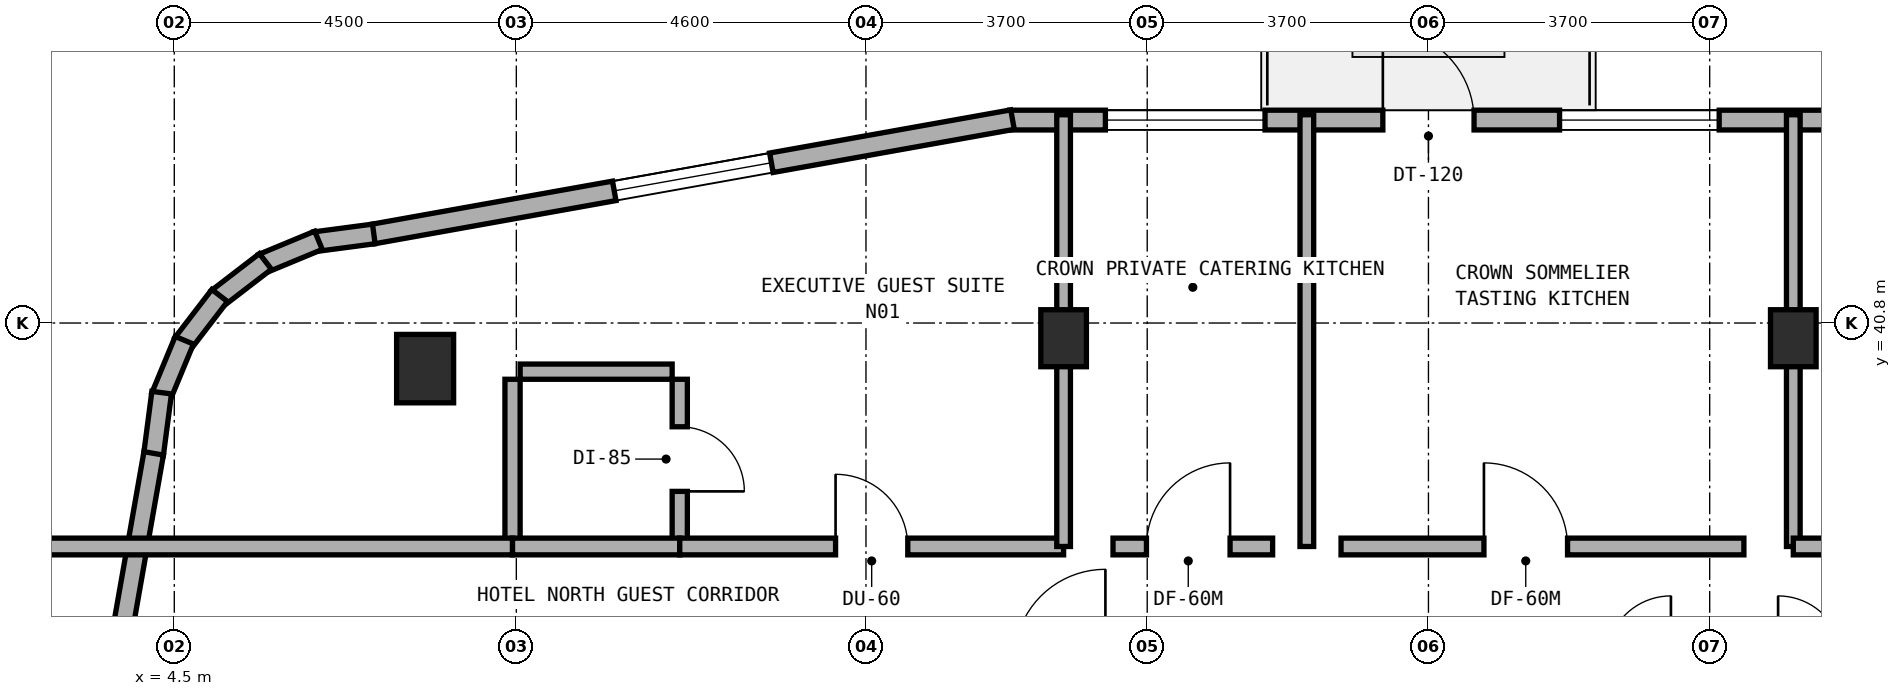
"""IFC4 building model, lengths in metres.
Left out: names, types, materials, properties, quantities, classifications, styles, units other than length and angle.
Written with IfcOpenShell. Run it as: python <this file> out.ifc"""

import sys

from ifc_helpers import new_model, si_unit, direction, frame, frame_2d, origin, origin_2d, place, context, subcontext, project, spatial, rectangle, extrude, element, fill, save


model = new_model("IFC4")
c1 = context("Model", 3, precision=1e-05, world=origin(), true_north=direction((0.0, 1.0)))
c2 = subcontext(c1, "Body", "Model", "MODEL_VIEW")
j1 = project(units=[si_unit("LENGTHUNIT", "METRE"), si_unit("PLANEANGLEUNIT", "RADIAN")], contexts=[c1])
p1 = place(None, origin())
s1 = spatial("IfcSite", under=j1, at=p1, CompositionType="ELEMENT")
p2 = place(p1, origin())
s2 = spatial("IfcBuilding", under=s1, at=p2, CompositionType="ELEMENT")
p3 = place(p2, frame((0.0, 0.0, 243.2)))
s3 = spatial("IfcBuildingStorey", under=s2, at=p3, CompositionType="ELEMENT", Elevation=243.2)
for number, where, z_axis, x_axis in (
    (1, (16.2, 40.6, 0.0), (0.0, 0.0, 1.0), (1.0, 0.0, 0.0)),
    (2, (25.8, 40.6, 0.0), (0.0, 0.0, 1.0), (1.0, 0.0, 0.0)),
):
    element("IfcColumn", number, at=place(p3, frame(where, z_axis=z_axis, x_axis=x_axis)), inside=s3, PredefinedType="COLUMN", context=c2, shape_type="SweptSolid", body=[
        extrude(rectangle(XDim=0.6, YDim=0.75, at=origin_2d()), origin(), (0.0, 0.0, 1.0), 3.6),
    ])
p4 = place(p3, frame((7.8, 40.2, 0.0), z_axis=(0.0, 0.0, 1.0), x_axis=(1.0, 0.0, 0.0)))
e3 = element("IfcColumn", 3, at=p4, inside=s3, PredefinedType="COLUMN", context=c2, shape_type="SweptSolid", body=[
    extrude(rectangle(XDim=0.75, YDim=0.9, at=origin_2d()), origin(), (0.0, 0.0, 1.0), 3.6),
])
p5 = place(p3, frame((26.545, 43.47, 0.0), z_axis=(0.0, 0.0, 1.0), x_axis=(-1.0, 0.0, 0.0)))
e4 = element("IfcWall", 4, at=p5, inside=s3, PredefinedType="STANDARD", context=c2, shape_type="SweptSolid", body=[
    extrude(rectangle(XDim=11.055, YDim=0.26, at=frame_2d((5.527, 0.0))), origin(), (0.0, 0.0, 1.0), 3.32),
])
p6 = place(p5, frame((4.945, 0.0, 0.0)))
e5 = element("IfcOpeningElement", 5, at=p6, cuts=e4, PredefinedType="OPENING", context=c2, shape_type="SweptSolid", body=[
    extrude(rectangle(XDim=1.2, YDim=2.15, at=frame_2d((0.6, 1.075))), frame((0.0, 0.14, 0.0), z_axis=(0.0, -1.0, 0.0), x_axis=(1.0, 0.0, 0.0)), (0.0, 0.0, 1.0), 0.28),
])
p7 = place(p5, frame((1.72, 0.0, 0.85)))
e6 = element("IfcOpeningElement", 6, at=p7, cuts=e4, PredefinedType="OPENING", context=c2, shape_type="SweptSolid", body=[
    extrude(rectangle(XDim=2.1, YDim=1.5, at=frame_2d((1.05, 0.75))), frame((0.0, 0.14, 0.0), z_axis=(0.0, -1.0, 0.0), x_axis=(1.0, 0.0, 0.0)), (0.0, 0.0, 1.0), 0.28),
])
p8 = place(p5, frame((7.695, 0.0, 0.85)))
e7 = element("IfcOpeningElement", 7, at=p8, cuts=e4, PredefinedType="OPENING", context=c2, shape_type="SweptSolid", body=[
    extrude(rectangle(XDim=2.1, YDim=1.5, at=frame_2d((1.05, 0.75))), frame((0.0, 0.14, 0.0), z_axis=(0.0, -1.0, 0.0), x_axis=(1.0, 0.0, 0.0)), (0.0, 0.0, 1.0), 0.28),
])
p9 = place(p3, frame((15.528, 43.476, 0.0), z_axis=(0.0, 0.0, 1.0), x_axis=(-0.98437102902, -0.176107005047, 0.0)))
e8 = element("IfcWall", 8, at=p9, inside=s3, PredefinedType="STANDARD", context=c2, shape_type="SweptSolid", body=[
    extrude(rectangle(XDim=8.547, YDim=0.26, at=frame_2d((4.273, 0.0))), origin(), (0.0, 0.0, 1.0), 3.32),
])
p10 = place(p9, frame((3.223, 0.0, 0.85)))
e9 = element("IfcOpeningElement", 9, at=p10, cuts=e8, PredefinedType="OPENING", context=c2, shape_type="SweptSolid", body=[
    extrude(rectangle(XDim=2.1, YDim=1.5, at=frame_2d((1.05, 0.75))), frame((0.0, 0.14, 0.0), z_axis=(0.0, -1.0, 0.0), x_axis=(1.0, 0.0, 0.0)), (0.0, 0.0, 1.0), 0.28),
])
p11 = place(p3, frame((7.125, 41.972, 0.0), z_axis=(0.0, 0.0, 1.0), x_axis=(-0.991458553189, -0.130422150372, 0.0)))
e10 = element("IfcWall", 10, at=p11, inside=s3, PredefinedType="STANDARD", context=c2, shape_type="SweptSolid", body=[
    extrude(rectangle(XDim=0.781, YDim=0.26, at=frame_2d((0.39, 0.0))), origin(), (0.0, 0.0, 1.0), 3.32),
])
p12 = place(p3, frame((6.397, 41.888, 0.0), z_axis=(0.0, 0.0, 1.0), x_axis=(-0.923789573295, -0.382900540965, 0.0)))
e11 = element("IfcWall", 11, at=p12, inside=s3, PredefinedType="STANDARD", context=c2, shape_type="SweptSolid", body=[
    extrude(rectangle(XDim=0.799, YDim=0.26, at=frame_2d((0.399, 0.0))), origin(), (0.0, 0.0, 1.0), 3.32),
])
for number, where, z_axis, x_axis in (
    (12, (5.699, 41.61, 0.0), (0.0, 0.0, 1.0), (-0.793, -0.609, 0.0)),
    (13, (5.097, 41.162, 0.0), (0.0, 0.0, 1.0), (-0.609, -0.793, 0.0)),
):
    element("IfcWall", number, at=place(p3, frame(where, z_axis=z_axis, x_axis=x_axis)), inside=s3, PredefinedType="STANDARD", context=c2, shape_type="SweptSolid", body=[
        extrude(rectangle(XDim=0.798, YDim=0.26, at=frame_2d((0.399, 0.0))), origin(), (0.0, 0.0, 1.0), 3.32),
    ])
p13 = place(p3, frame((4.632, 40.573, 0.0), z_axis=(0.0, 0.0, 1.0), x_axis=(-0.383161279238, -0.923681457047, 0.0)))
e14 = element("IfcWall", 14, at=p13, inside=s3, PredefinedType="STANDARD", context=c2, shape_type="SweptSolid", body=[
    extrude(rectangle(XDim=0.799, YDim=0.26, at=frame_2d((0.399, 0.0))), origin(), (0.0, 0.0, 1.0), 3.32),
])
p14 = place(p3, frame((4.334, 39.884, 0.0), z_axis=(0.0, 0.0, 1.0), x_axis=(-0.129850802102, -0.99153354416, 0.0)))
e15 = element("IfcWall", 15, at=p14, inside=s3, PredefinedType="STANDARD", context=c2, shape_type="SweptSolid", body=[
    extrude(rectangle(XDim=0.816, YDim=0.26, at=frame_2d((0.408, 0.0))), origin(), (0.0, 0.0, 1.0), 3.32),
])
p15 = place(p3, frame((4.229, 39.085, 0.0), z_axis=(0.0, 0.0, 1.0), x_axis=(-0.173396937698, -0.984852020355, 0.0)))
e16 = element("IfcWall", 16, at=p15, inside=s3, PredefinedType="STANDARD", context=c2, shape_type="SweptSolid", body=[
    extrude(rectangle(XDim=8.714, YDim=0.26, at=frame_2d((4.357, 0.0))), origin(), (0.0, 0.0, 1.0), 3.32),
])
p16 = place(p15, frame((3.987, 0.0, 0.85)))
e17 = element("IfcOpeningElement", 17, at=p16, cuts=e16, PredefinedType="OPENING", context=c2, shape_type="SweptSolid", body=[
    extrude(rectangle(XDim=2.1, YDim=1.5, at=frame_2d((1.05, 0.75))), frame((0.0, 0.14, 0.0), z_axis=(0.0, -1.0, 0.0), x_axis=(1.0, 0.0, 0.0)), (0.0, 0.0, 1.0), 0.28),
])
p17 = place(p3, frame((11.15, 37.96, 0.0), z_axis=(0.0, 0.0, 1.0), x_axis=(0.0, 1.0, 0.0)))
e18 = element("IfcWall", 18, at=p17, inside=s3, PredefinedType="PLUMBINGWALL", context=c2, shape_type="SweptSolid", body=[
    extrude(rectangle(XDim=2.1, YDim=0.2, at=frame_2d((1.05, 0.0))), origin(), (0.0, 0.0, 1.0), 2.995),
])
p18 = place(p17, frame((0.625, 0.0, 0.0)))
e19 = element("IfcOpeningElement", 19, at=p18, cuts=e18, PredefinedType="OPENING", context=c2, shape_type="SweptSolid", body=[
    extrude(rectangle(XDim=0.85, YDim=2.1, at=frame_2d((0.425, 1.05))), frame((0.0, 0.11, 0.0), z_axis=(0.0, -1.0, 0.0), x_axis=(1.0, 0.0, 0.0)), (0.0, 0.0, 1.0), 0.22),
])
p19 = place(p3, frame((9.05, 40.16, 0.0), z_axis=(0.0, 0.0, 1.0), x_axis=(1.0, 0.0, 0.0)))
e20 = element("IfcWall", 20, at=p19, inside=s3, PredefinedType="PLUMBINGWALL", context=c2, shape_type="SweptSolid", body=[
    extrude(rectangle(XDim=2.0, YDim=0.2, at=frame_2d((1.0, 0.0))), origin(), (0.0, 0.0, 1.0), 3.015),
])
p20 = place(p3, frame((8.95, 37.96, 0.0), z_axis=(0.0, 0.0, 1.0), x_axis=(0.0, 1.0, 0.0)))
e21 = element("IfcWall", 21, at=p20, inside=s3, PredefinedType="PLUMBINGWALL", context=c2, shape_type="SweptSolid", body=[
    extrude(rectangle(XDim=2.1, YDim=0.2, at=frame_2d((1.05, 0.0))), origin(), (0.0, 0.0, 1.0), 2.995),
])
p21 = place(p3, frame((2.76, 37.86, 0.0), z_axis=(0.0, 0.0, 1.0), x_axis=(1.0, 0.0, 0.0)))
e22 = element("IfcWall", 22, at=p21, inside=s3, PredefinedType="SOLIDWALL", context=c2, shape_type="SweptSolid", body=[
    extrude(rectangle(XDim=6.19, YDim=0.22, at=frame_2d((3.095, 0.0))), origin(), (0.0, 0.0, 1.0), 2.745),
])
p22 = place(p3, frame((8.95, 37.86, 0.0), z_axis=(0.0, 0.0, 1.0), x_axis=(1.0, 0.0, 0.0)))
e23 = element("IfcWall", 23, at=p22, inside=s3, PredefinedType="SOLIDWALL", context=c2, shape_type="SweptSolid", body=[
    extrude(rectangle(XDim=2.2, YDim=0.22, at=frame_2d((1.1, 0.0))), origin(), (0.0, 0.0, 1.0), 3.32),
])
p23 = place(p3, frame((11.15, 37.86, 0.0), z_axis=(0.0, 0.0, 1.0), x_axis=(1.0, 0.0, 0.0)))
e24 = element("IfcWall", 24, at=p23, inside=s3, PredefinedType="SOLIDWALL", context=c2, shape_type="SweptSolid", body=[
    extrude(rectangle(XDim=5.05, YDim=0.22, at=frame_2d((2.525, 0.0))), origin(), (0.0, 0.0, 1.0), 2.745),
])
p24 = place(p23, frame((2.05, 0.0, 0.0)))
e25 = element("IfcOpeningElement", 25, at=p24, cuts=e24, PredefinedType="OPENING", context=c2, shape_type="SweptSolid", body=[
    extrude(rectangle(XDim=0.95, YDim=2.1, at=frame_2d((0.475, 1.05))), frame((0.0, 0.12, 0.0), z_axis=(0.0, -1.0, 0.0), x_axis=(1.0, 0.0, 0.0)), (0.0, 0.0, 1.0), 0.24),
])
p25 = place(p3, frame((16.2, 37.86, 0.0), z_axis=(0.0, 0.0, 1.0), x_axis=(0.0, 1.0, 0.0)))
e26 = element("IfcWall", 26, at=p25, inside=s3, PredefinedType="SOLIDWALL", context=c2, shape_type="SweptSolid", body=[
    extrude(rectangle(XDim=5.68, YDim=0.18, at=frame_2d((2.84, 0.0))), origin(), (0.0, 0.0, 1.0), 2.745),
])
p26 = place(p3, frame((19.4, 37.86, 0.0), z_axis=(0.0, 0.0, 1.0), x_axis=(0.0, 1.0, 0.0)))
e27 = element("IfcWall", 27, at=p26, inside=s3, PredefinedType="SOLIDWALL", context=c2, shape_type="SweptSolid", body=[
    extrude(rectangle(XDim=5.68, YDim=0.18, at=frame_2d((2.84, 0.0))), origin(), (0.0, 0.0, 1.0), 2.995),
])
p27 = place(p3, frame((16.85, 37.86, 0.0), z_axis=(0.0, 0.0, 1.0), x_axis=(1.0, 0.0, 0.0)))
e28 = element("IfcWall", 28, at=p27, inside=s3, PredefinedType="SOLIDWALL", context=c2, shape_type="SweptSolid", body=[
    extrude(rectangle(XDim=2.1, YDim=0.22, at=frame_2d((1.05, 0.0))), origin(), (0.0, 0.0, 1.0), 3.32),
])
p28 = place(p27, frame((0.44, 0.0, 0.0)))
e29 = element("IfcOpeningElement", 29, at=p28, cuts=e28, PredefinedType="OPENING", context=c2, shape_type="SweptSolid", body=[
    extrude(rectangle(XDim=1.1, YDim=2.1, at=frame_2d((0.55, 1.05))), frame((0.0, 0.12, 0.0), z_axis=(0.0, -1.0, 0.0), x_axis=(1.0, 0.0, 0.0)), (0.0, 0.0, 1.0), 0.24),
])
p29 = place(p3, frame((19.85, 37.86, 0.0), z_axis=(0.0, 0.0, 1.0), x_axis=(1.0, 0.0, 0.0)))
e30 = element("IfcWall", 30, at=p29, inside=s3, PredefinedType="SOLIDWALL", context=c2, shape_type="SweptSolid", body=[
    extrude(rectangle(XDim=5.3, YDim=0.22, at=frame_2d((2.65, 0.0))), origin(), (0.0, 0.0, 1.0), 3.32),
])
p30 = place(p29, frame((1.88, 0.0, 0.0)))
e31 = element("IfcOpeningElement", 31, at=p30, cuts=e30, PredefinedType="OPENING", context=c2, shape_type="SweptSolid", body=[
    extrude(rectangle(XDim=1.1, YDim=2.1, at=frame_2d((0.55, 1.05))), frame((0.0, 0.12, 0.0), z_axis=(0.0, -1.0, 0.0), x_axis=(1.0, 0.0, 0.0)), (0.0, 0.0, 1.0), 0.24),
])
p31 = place(p3, frame((25.8, 37.86, 0.0), z_axis=(0.0, 0.0, 1.0), x_axis=(0.0, 1.0, 0.0)))
e32 = element("IfcWall", 32, at=p31, inside=s3, PredefinedType="SOLIDWALL", context=c2, shape_type="SweptSolid", body=[
    extrude(rectangle(XDim=5.68, YDim=0.18, at=frame_2d((2.84, 0.0))), origin(), (0.0, 0.0, 1.0), 2.745),
])
p32 = place(p3, frame((25.8, 37.86, 0.0), z_axis=(0.0, 0.0, 1.0), x_axis=(1.0, 0.0, 0.0)))
e33 = element("IfcWall", 33, at=p32, inside=s3, PredefinedType="SOLIDWALL", context=c2, shape_type="SweptSolid", body=[
    extrude(rectangle(XDim=5.05, YDim=0.22, at=frame_2d((2.525, 0.0))), origin(), (0.0, 0.0, 1.0), 2.745),
])
p33 = place(p32, frame((2.05, 0.0, 0.0)))
e34 = element("IfcOpeningElement", 34, at=p33, cuts=e33, PredefinedType="OPENING", context=c2, shape_type="SweptSolid", body=[
    extrude(rectangle(XDim=0.95, YDim=2.1, at=frame_2d((0.475, 1.05))), frame((0.0, 0.12, 0.0), z_axis=(0.0, -1.0, 0.0), x_axis=(1.0, 0.0, 0.0)), (0.0, 0.0, 1.0), 0.24),
])
p34 = place(p6, frame((1.2, 0.0, 0.0), z_axis=(0.0, 0.0, 1.0), x_axis=(-1.0, 0.0, 0.0)))
e35 = element("IfcDoor", 35, at=p34, inside=s3, OperationType="SINGLE_SWING_LEFT", PredefinedType="DOOR", context=c2, shape_type="SweptSolid", body=[
    extrude(rectangle(XDim=1.2, YDim=2.15, at=frame_2d((0.6, 1.075))), frame((0.0, 0.025, 0.0), z_axis=(0.0, -1.0, 0.0), x_axis=(1.0, 0.0, 0.0)), (0.0, 0.0, 1.0), 0.05),
])
fill(e5, e35)
p35 = place(p7, origin())
e36 = element("IfcWindow", 36, at=p35, inside=s3, PartitioningType="SINGLE_PANEL", PredefinedType="WINDOW", context=c2, shape_type="SweptSolid", body=[
    extrude(rectangle(XDim=2.1, YDim=1.5, at=frame_2d((1.05, 0.75))), frame((0.0, 0.03, 0.0), z_axis=(0.0, -1.0, 0.0), x_axis=(1.0, 0.0, 0.0)), (0.0, 0.0, 1.0), 0.06),
])
fill(e6, e36)
p36 = place(p8, origin())
e37 = element("IfcWindow", 37, at=p36, inside=s3, PartitioningType="SINGLE_PANEL", PredefinedType="WINDOW", context=c2, shape_type="SweptSolid", body=[
    extrude(rectangle(XDim=2.1, YDim=1.5, at=frame_2d((1.05, 0.75))), frame((0.0, 0.03, 0.0), z_axis=(0.0, -1.0, 0.0), x_axis=(1.0, 0.0, 0.0)), (0.0, 0.0, 1.0), 0.06),
])
fill(e7, e37)
p37 = place(p10, origin())
e38 = element("IfcWindow", 38, at=p37, inside=s3, PartitioningType="SINGLE_PANEL", PredefinedType="WINDOW", context=c2, shape_type="SweptSolid", body=[
    extrude(rectangle(XDim=2.1, YDim=1.5, at=frame_2d((1.05, 0.75))), frame((0.0, 0.03, 0.0), z_axis=(0.0, -1.0, 0.0), x_axis=(1.0, 0.0, 0.0)), (0.0, 0.0, 1.0), 0.06),
])
fill(e9, e38)
p38 = place(p18, frame((0.85, 0.0, 0.0), z_axis=(0.0, 0.0, 1.0), x_axis=(-1.0, 0.0, 0.0)))
e39 = element("IfcDoor", 39, at=p38, inside=s3, OperationType="SINGLE_SWING_RIGHT", PredefinedType="DOOR", context=c2, shape_type="SweptSolid", body=[
    extrude(rectangle(XDim=0.85, YDim=2.1, at=frame_2d((0.425, 1.05))), frame((0.0, 0.025, 0.0), z_axis=(0.0, -1.0, 0.0), x_axis=(1.0, 0.0, 0.0)), (0.0, 0.0, 1.0), 0.05),
])
fill(e19, e39)
p39 = place(p24, origin())
e40 = element("IfcDoor", 40, at=p39, inside=s3, OperationType="SINGLE_SWING_LEFT", PredefinedType="DOOR", context=c2, shape_type="SweptSolid", body=[
    extrude(rectangle(XDim=0.95, YDim=2.1, at=frame_2d((0.475, 1.05))), frame((0.0, 0.025, 0.0), z_axis=(0.0, -1.0, 0.0), x_axis=(1.0, 0.0, 0.0)), (0.0, 0.0, 1.0), 0.05),
])
fill(e25, e40)
p40 = place(p28, origin())
e41 = element("IfcDoor", 41, at=p40, inside=s3, OperationType="SINGLE_SWING_RIGHT", PredefinedType="DOOR", context=c2, shape_type="SweptSolid", body=[
    extrude(rectangle(XDim=1.1, YDim=2.1, at=frame_2d((0.55, 1.05))), frame((0.0, 0.025, 0.0), z_axis=(0.0, -1.0, 0.0), x_axis=(1.0, 0.0, 0.0)), (0.0, 0.0, 1.0), 0.05),
])
fill(e29, e41)
p41 = place(p30, origin())
e42 = element("IfcDoor", 42, at=p41, inside=s3, OperationType="SINGLE_SWING_LEFT", PredefinedType="DOOR", context=c2, shape_type="SweptSolid", body=[
    extrude(rectangle(XDim=1.1, YDim=2.1, at=frame_2d((0.55, 1.05))), frame((0.0, 0.025, 0.0), z_axis=(0.0, -1.0, 0.0), x_axis=(1.0, 0.0, 0.0)), (0.0, 0.0, 1.0), 0.05),
])
fill(e31, e42)
save(model, sys.argv[1])
